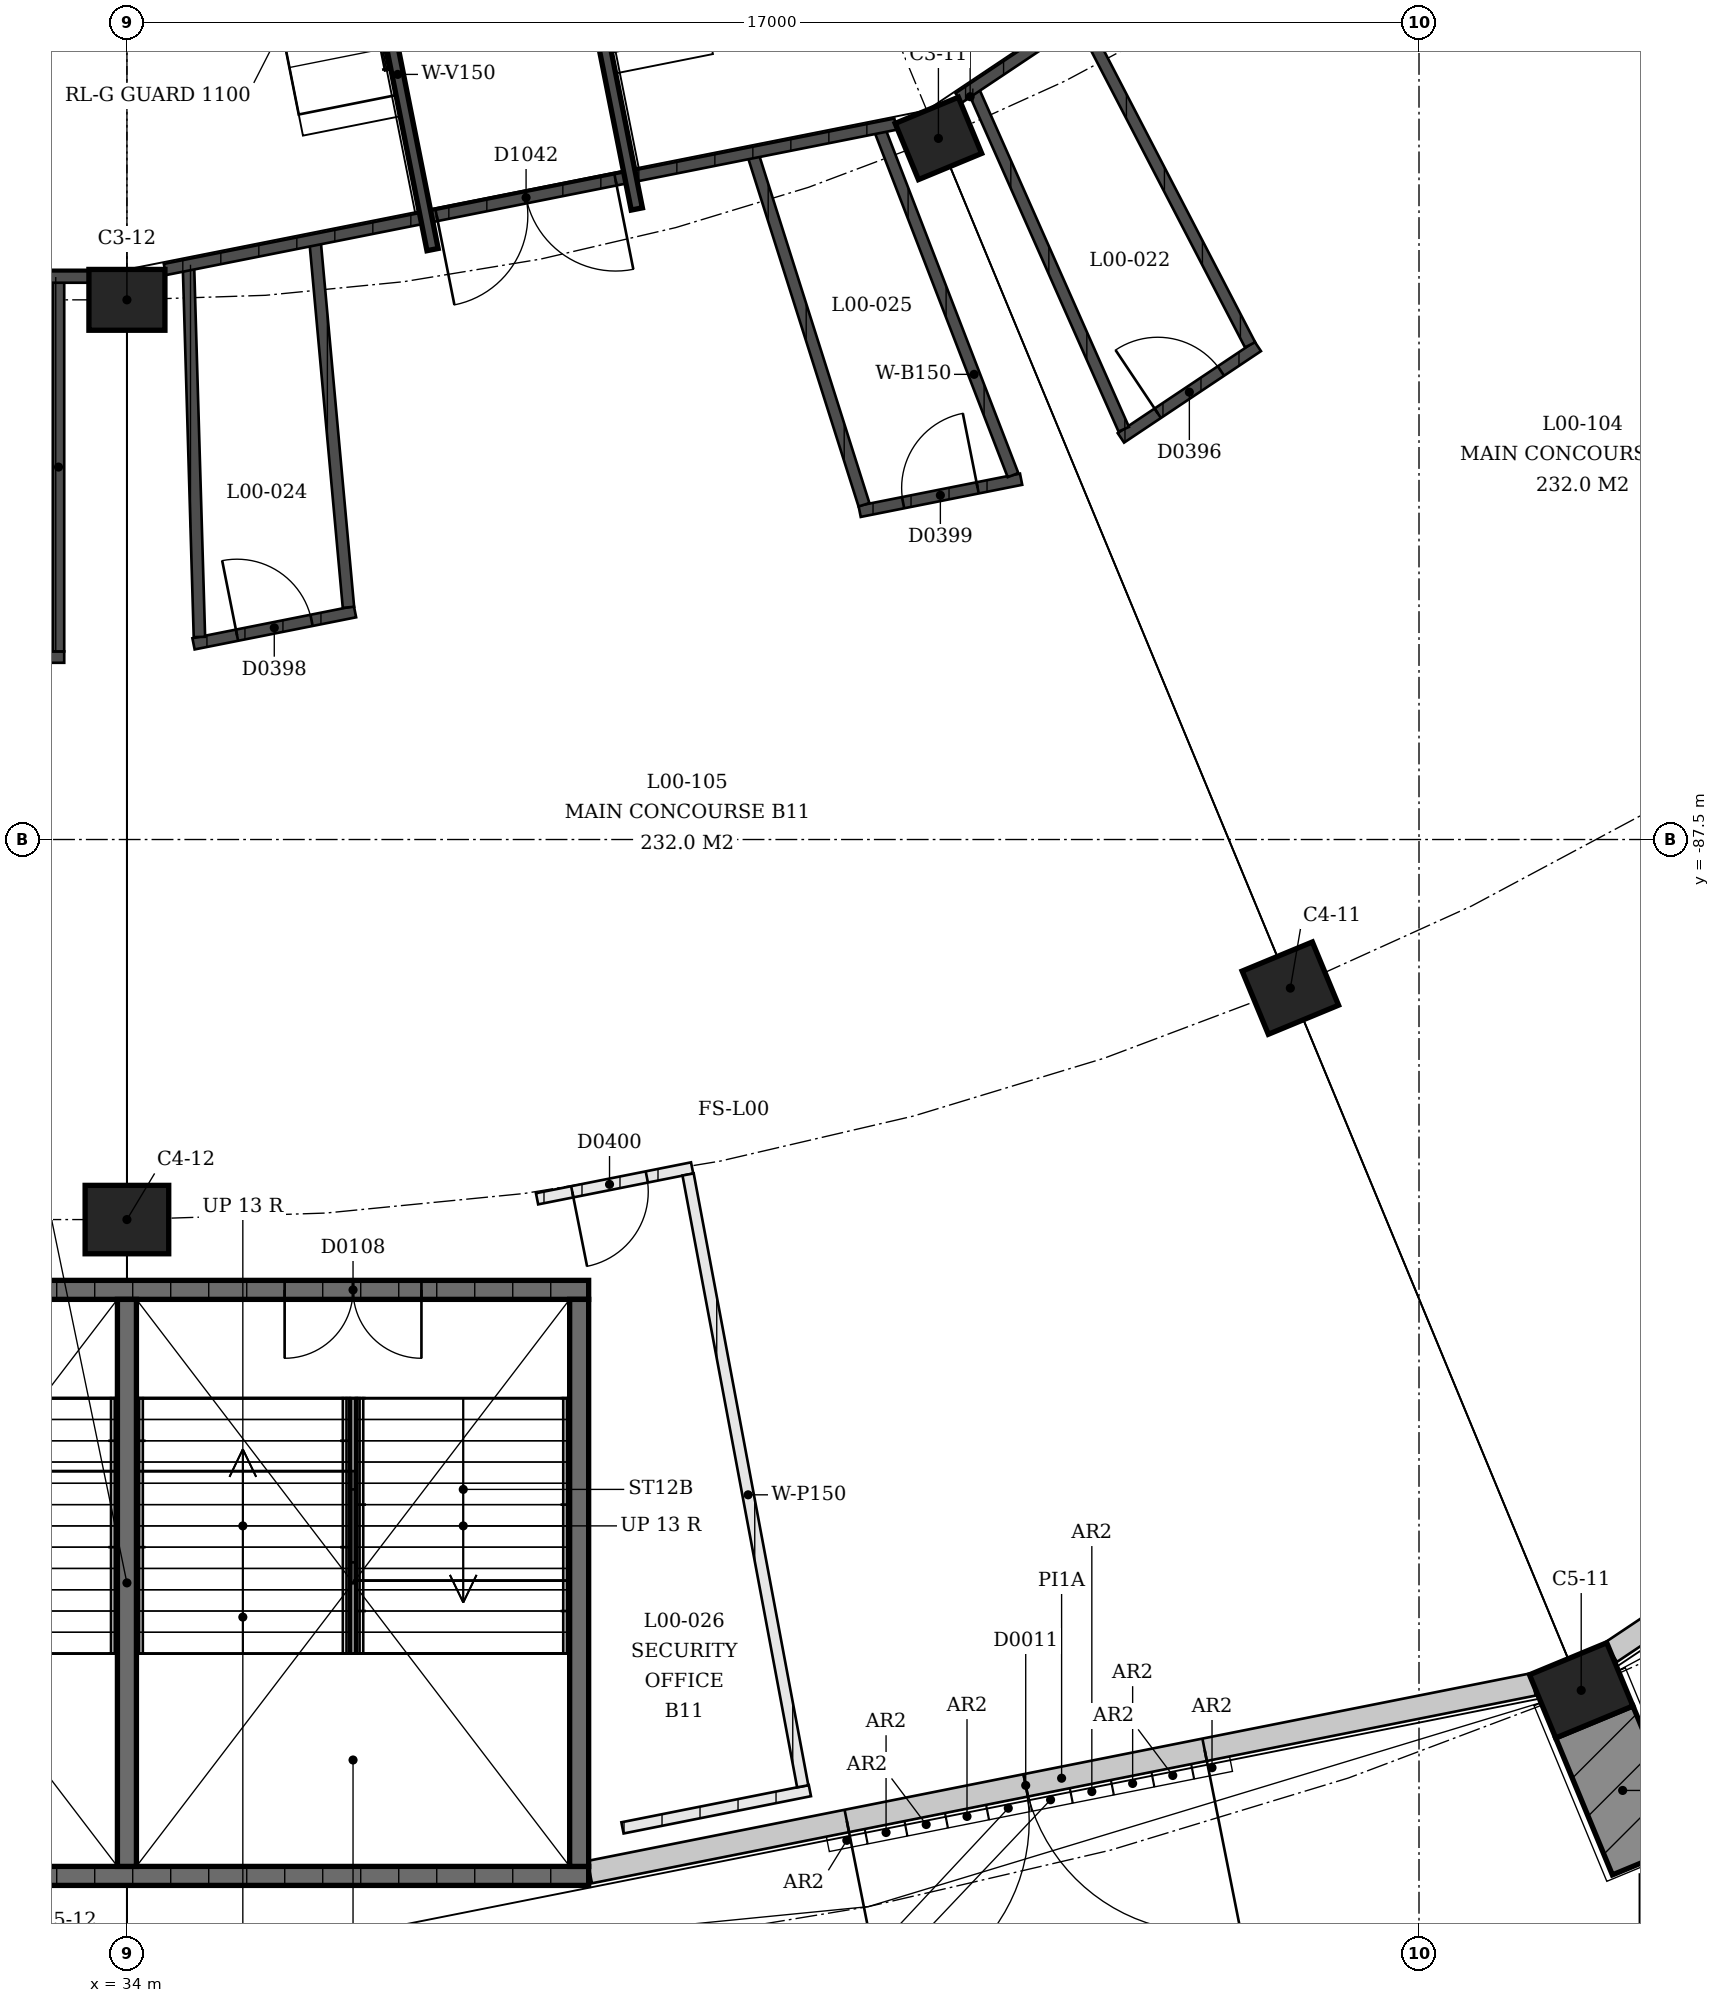
"""IFC4 building model, lengths in metres.
Left out: names, types, materials, properties, quantities, classifications, styles, units other than length and angle.
Written with IfcOpenShell. Run it as: python <this file> out.ifc"""

import sys

from ifc_helpers import new_model, si_unit, direction, frame, frame_2d, origin, origin_2d, place, context, subcontext, project, spatial, rectangle, extrude, element, fill, save


model = new_model("IFC4")
c1 = context("Model", 3, precision=1e-05, world=origin(), true_north=direction((0.0, 1.0)))
c2 = subcontext(c1, "Body", "Model", "MODEL_VIEW")
j1 = project(units=[si_unit("LENGTHUNIT", "METRE"), si_unit("PLANEANGLEUNIT", "RADIAN")], contexts=[c1])
p1 = place(None, origin())
s1 = spatial("IfcSite", under=j1, at=p1, CompositionType="ELEMENT")
p2 = place(p1, origin())
s2 = spatial("IfcBuilding", under=s1, at=p2, CompositionType="ELEMENT")
p3 = place(p2, origin())
s3 = spatial("IfcBuildingStorey", under=s2, at=p3, CompositionType="ELEMENT", Elevation=0.0)
p4 = place(p3, frame((44.677, -78.276, 0.0), z_axis=(0.0, 0.0, 1.0), x_axis=(0.923879532511, 0.382683432365, 0.0)))
e1 = element("IfcColumn", 1, at=p4, inside=s3, PredefinedType="COLUMN", context=c2, shape_type="SweptSolid", body=[
    extrude(rectangle(XDim=0.9, YDim=0.8, at=origin_2d()), origin(), (0.0, 0.0, 1.0), 4.5),
])
p5 = place(p3, frame((49.307, -89.455, 0.0), z_axis=(0.0, 0.0, 1.0), x_axis=(0.923879532511, 0.382683432365, 0.0)))
e2 = element("IfcColumn", 2, at=p5, inside=s3, PredefinedType="COLUMN", context=c2, shape_type="SweptSolid", body=[
    extrude(rectangle(XDim=1.0, YDim=0.9, at=origin_2d()), origin(), (0.0, 0.0, 1.0), 4.5),
])
p6 = place(p3, frame((53.134, -98.694, 0.0), z_axis=(0.0, 0.0, 1.0), x_axis=(0.923879532511, 0.382683432365, 0.0)))
e3 = element("IfcColumn", 3, at=p6, inside=s3, PredefinedType="COLUMN", context=c2, shape_type="SweptSolid", body=[
    extrude(rectangle(XDim=1.1, YDim=0.9, at=origin_2d()), origin(), (0.0, 0.0, 1.0), 4.5),
])
p7 = place(p3, frame((34.0, -80.4, 0.0), z_axis=(0.0, 0.0, 1.0), x_axis=(1.0, 0.0, 0.0)))
e4 = element("IfcColumn", 4, at=p7, inside=s3, PredefinedType="COLUMN", context=c2, shape_type="SweptSolid", body=[
    extrude(rectangle(XDim=1.0, YDim=0.8, at=origin_2d()), origin(), (0.0, 0.0, 1.0), 4.5),
])
p8 = place(p3, frame((34.0, -92.5, 0.0), z_axis=(0.0, 0.0, 1.0), x_axis=(1.0, 0.0, 0.0)))
e5 = element("IfcColumn", 5, at=p8, inside=s3, PredefinedType="COLUMN", context=c2, shape_type="SweptSolid", body=[
    extrude(rectangle(XDim=1.1, YDim=0.9, at=origin_2d()), origin(), (0.0, 0.0, 1.0), 4.5),
])
p9 = place(p3, frame((64.061, -91.152, 0.0), z_axis=(0.0, 0.0, 1.0), x_axis=(-0.831466044974, -0.555575571867, 0.0)))
e6 = element("IfcWall", 6, at=p9, inside=s3, PredefinedType="SOLIDWALL", context=c2, shape_type="SweptSolid", body=[
    extrude(rectangle(XDim=12.675, YDim=0.3, at=frame_2d((6.337, 0.0))), origin(), (0.0, 0.0, 1.0), 2.79),
])
p10 = place(p9, frame((4.363, 0.0, 0.0)))
e7 = element("IfcOpeningElement", 7, at=p10, cuts=e6, PredefinedType="OPENING", context=c2, shape_type="SweptSolid", body=[
    extrude(rectangle(XDim=3.0, YDim=2.4, at=frame_2d((1.5, 1.2))), frame((0.0, 0.16, 0.0), z_axis=(0.0, -1.0, 0.0), x_axis=(1.0, 0.0, 0.0)), (0.0, 0.0, 1.0), 0.32),
])
p11 = place(p3, frame((52.506, -98.615, 0.0), z_axis=(0.0, 0.0, 1.0), x_axis=(-0.980783376708, -0.195099892294, 0.0)))
e8 = element("IfcWall", 8, at=p11, inside=s3, PredefinedType="SOLIDWALL", context=c2, shape_type="SweptSolid", body=[
    extrude(rectangle(XDim=12.66, YDim=0.3, at=frame_2d((6.33, 0.0))), origin(), (0.0, 0.0, 1.0), 2.79),
])
p12 = place(p11, frame((4.412, 0.0, 0.0)))
e9 = element("IfcOpeningElement", 9, at=p12, cuts=e8, PredefinedType="OPENING", context=c2, shape_type="SweptSolid", body=[
    extrude(rectangle(XDim=4.8, YDim=2.4, at=frame_2d((2.4, 1.2))), frame((0.0, 0.16, 0.0), z_axis=(0.0, -1.0, 0.0), x_axis=(1.0, 0.0, 0.0)), (0.0, 0.0, 1.0), 0.32),
])
p13 = place(p3, frame((27.925, -93.425, 0.0), z_axis=(0.0, 0.0, 1.0), x_axis=(1.0, 0.0, 0.0)))
e10 = element("IfcWall", 10, at=p13, inside=s3, PredefinedType="SHEAR", context=c2, shape_type="SweptSolid", body=[
    extrude(rectangle(XDim=12.15, YDim=0.25, at=frame_2d((6.075, 0.0))), origin(), (0.0, 0.0, 1.0), 4.09),
])
p14 = place(p13, frame((2.2, 0.0, 0.0)))
e11 = element("IfcOpeningElement", 11, at=p14, cuts=e10, PredefinedType="OPENING", context=c2, shape_type="SweptSolid", body=[
    extrude(rectangle(XDim=1.8, YDim=2.1, at=frame_2d((0.9, 1.05))), frame((0.0, 0.125, 0.0), z_axis=(0.0, -1.0, 0.0), x_axis=(1.0, 0.0, 0.0)), (0.0, 0.0, 1.0), 0.25),
])
p15 = place(p13, frame((8.15, 0.0, 0.0)))
e12 = element("IfcOpeningElement", 12, at=p15, cuts=e10, PredefinedType="OPENING", context=c2, shape_type="SweptSolid", body=[
    extrude(rectangle(XDim=1.8, YDim=2.1, at=frame_2d((0.9, 1.05))), frame((0.0, 0.125, 0.0), z_axis=(0.0, -1.0, 0.0), x_axis=(1.0, 0.0, 0.0)), (0.0, 0.0, 1.0), 0.25),
])
p16 = place(p3, frame((27.925, -101.135, 0.0), z_axis=(0.0, 0.0, 1.0), x_axis=(1.0, 0.0, 0.0)))
e13 = element("IfcWall", 13, at=p16, inside=s3, PredefinedType="SHEAR", context=c2, shape_type="SweptSolid", body=[
    extrude(rectangle(XDim=12.15, YDim=0.25, at=frame_2d((6.075, 0.0))), origin(), (0.0, 0.0, 1.0), 4.09),
])
for number, where, z_axis, x_axis in (
    (14, (39.95, -93.55, 0.0), (0.0, 0.0, 1.0), (0.0, -1.0, 0.0)),
    (15, (34.0, -93.55, 0.0), (0.0, 0.0, 1.0), (0.0, -1.0, 0.0)),
):
    element("IfcWall", number, at=place(p3, frame(where, z_axis=z_axis, x_axis=x_axis)), inside=s3, PredefinedType="SHEAR", context=c2, shape_type="SweptSolid", body=[
        extrude(rectangle(XDim=7.46, YDim=0.25, at=frame_2d((3.73, 0.0))), origin(), (0.0, 0.0, 1.0), 4.09),
    ])
p17 = place(p3, frame((51.419, -73.417, 0.0), z_axis=(0.0, 0.0, 1.0), x_axis=(0.639917382336, -0.768443715431, 0.0)))
e16 = element("IfcWall", 16, at=p17, inside=s3, PredefinedType="SOLIDWALL", context=c2, shape_type="SweptSolid", body=[
    extrude(rectangle(XDim=4.857, YDim=0.15, at=frame_2d((2.429, 0.0))), origin(), (0.0, 0.0, 1.0), 3.0),
])
p18 = place(p3, frame((48.879, -81.012, 0.0), z_axis=(0.0, 0.0, 1.0), x_axis=(-0.831460345356, -0.555584101735, 0.0)))
e17 = element("IfcWall", 17, at=p18, inside=s3, PredefinedType="SOLIDWALL", context=c2, shape_type="SweptSolid", body=[
    extrude(rectangle(XDim=2.167, YDim=0.15, at=frame_2d((1.083, 0.0))), origin(), (0.0, 0.0, 1.0), 3.0),
])
p19 = place(p18, frame((0.583, 0.0, 0.0)))
e18 = element("IfcOpeningElement", 18, at=p19, cuts=e17, PredefinedType="OPENING", context=c2, shape_type="SweptSolid", body=[
    extrude(rectangle(XDim=1.0, YDim=2.1, at=frame_2d((0.5, 1.05))), frame((0.0, 0.075, 0.0), z_axis=(0.0, -1.0, 0.0), x_axis=(1.0, 0.0, 0.0)), (0.0, 0.0, 1.0), 0.15),
])
p20 = place(p3, frame((46.54, -76.677, 0.0), z_axis=(0.0, 0.0, 1.0), x_axis=(0.460446193467, -0.887687615618, 0.0)))
e19 = element("IfcWall", 19, at=p20, inside=s3, PredefinedType="SOLIDWALL", context=c2, shape_type="SweptSolid", body=[
    extrude(rectangle(XDim=4.86, YDim=0.15, at=frame_2d((2.43, 0.0))), origin(), (0.0, 0.0, 1.0), 3.0),
])
p21 = place(p3, frame((45.129, -77.62, 0.0), z_axis=(0.0, 0.0, 1.0), x_axis=(0.405098626615, -0.914272991352, 0.0)))
e20 = element("IfcWall", 20, at=p21, inside=s3, PredefinedType="SOLIDWALL", context=c2, shape_type="SweptSolid", body=[
    extrude(rectangle(XDim=4.903, YDim=0.15, at=frame_2d((2.451, 0.0))), origin(), (0.0, 0.0, 1.0), 3.0),
])
p22 = place(p3, frame((34.876, -84.926, 0.0), z_axis=(0.0, 0.0, 1.0), x_axis=(0.980766609665, 0.195184162696, 0.0)))
e21 = element("IfcWall", 21, at=p22, inside=s3, PredefinedType="SOLIDWALL", context=c2, shape_type="SweptSolid", body=[
    extrude(rectangle(XDim=2.167, YDim=0.15, at=frame_2d((1.083, 0.0))), origin(), (0.0, 0.0, 1.0), 3.0),
])
p23 = place(p22, frame((0.583, 0.0, 0.0)))
e22 = element("IfcOpeningElement", 22, at=p23, cuts=e21, PredefinedType="OPENING", context=c2, shape_type="SweptSolid", body=[
    extrude(rectangle(XDim=1.0, YDim=2.1, at=frame_2d((0.5, 1.05))), frame((0.0, 0.075, 0.0), z_axis=(0.0, -1.0, 0.0), x_axis=(1.0, 0.0, 0.0)), (0.0, 0.0, 1.0), 0.15),
])
p24 = place(p3, frame((34.809, -79.939, 0.0), z_axis=(0.0, 0.0, 1.0), x_axis=(0.02950597086, -0.999564604057, 0.0)))
e23 = element("IfcWall", 23, at=p24, inside=s3, PredefinedType="SOLIDWALL", context=c2, shape_type="SweptSolid", body=[
    extrude(rectangle(XDim=4.898, YDim=0.15, at=frame_2d((2.449, 0.0))), origin(), (0.0, 0.0, 1.0), 3.0),
])
p25 = place(p3, frame((36.473, -79.608, 0.0), z_axis=(0.0, 0.0, 1.0), x_axis=(0.090871085934, -0.995862664096, 0.0)))
e24 = element("IfcWall", 24, at=p25, inside=s3, PredefinedType="SOLIDWALL", context=c2, shape_type="SweptSolid", body=[
    extrude(rectangle(XDim=4.857, YDim=0.15, at=frame_2d((2.429, 0.0))), origin(), (0.0, 0.0, 1.0), 3.0),
])
p26 = place(p3, frame((43.64, -83.182, 0.0), z_axis=(0.0, 0.0, 1.0), x_axis=(0.980788176969, 0.195075759432, 0.0)))
e25 = element("IfcWall", 25, at=p26, inside=s3, PredefinedType="SOLIDWALL", context=c2, shape_type="SweptSolid", body=[
    extrude(rectangle(XDim=2.166, YDim=0.15, at=frame_2d((1.083, 0.0))), origin(), (0.0, 0.0, 1.0), 3.0),
])
p27 = place(p26, frame((0.583, 0.0, 0.0)))
e26 = element("IfcOpeningElement", 26, at=p27, cuts=e25, PredefinedType="OPENING", context=c2, shape_type="SweptSolid", body=[
    extrude(rectangle(XDim=1.0, YDim=2.1, at=frame_2d((0.5, 1.05))), frame((0.0, 0.075, 0.0), z_axis=(0.0, -1.0, 0.0), x_axis=(1.0, 0.0, 0.0)), (0.0, 0.0, 1.0), 0.15),
])
p28 = place(p3, frame((42.229, -78.463, 0.0), z_axis=(0.0, 0.0, 1.0), x_axis=(0.302162587804, -0.953256403352, 0.0)))
e27 = element("IfcWall", 27, at=p28, inside=s3, PredefinedType="SOLIDWALL", context=c2, shape_type="SweptSolid", body=[
    extrude(rectangle(XDim=4.86, YDim=0.15, at=frame_2d((2.43, 0.0))), origin(), (0.0, 0.0, 1.0), 3.0),
])
p29 = place(p3, frame((43.893, -78.132, 0.0), z_axis=(0.0, 0.0, 1.0), x_axis=(0.360073313022, -0.932924010437, 0.0)))
e28 = element("IfcWall", 28, at=p29, inside=s3, PredefinedType="SOLIDWALL", context=c2, shape_type="SweptSolid", body=[
    extrude(rectangle(XDim=4.903, YDim=0.15, at=frame_2d((2.451, 0.0))), origin(), (0.0, 0.0, 1.0), 3.0),
])
p30 = place(p3, frame((39.396, -92.227, 0.0), z_axis=(0.0, 0.0, 1.0), x_axis=(0.980792255889, 0.195055250603, 0.0)))
e29 = element("IfcWall", 29, at=p30, inside=s3, PredefinedType="PARTITIONING", context=c2, shape_type="SweptSolid", body=[
    extrude(rectangle(XDim=2.08, YDim=0.15, at=frame_2d((1.04, 0.0))), origin(), (0.0, 0.0, 1.0), 3.0),
])
p31 = place(p30, frame((0.472, 0.0, 0.0)))
e30 = element("IfcOpeningElement", 30, at=p31, cuts=e29, PredefinedType="OPENING", context=c2, shape_type="SweptSolid", body=[
    extrude(rectangle(XDim=1.0, YDim=2.1, at=frame_2d((0.5, 1.05))), frame((0.0, 0.075, 0.0), z_axis=(0.0, -1.0, 0.0), x_axis=(1.0, 0.0, 0.0)), (0.0, 0.0, 1.0), 0.15),
])
p32 = place(p3, frame((40.52, -100.503, 0.0), z_axis=(0.0, 0.0, 1.0), x_axis=(0.980796747004, 0.195032666665, 0.0)))
e31 = element("IfcWall", 31, at=p32, inside=s3, PredefinedType="PARTITIONING", context=c2, shape_type="SweptSolid", body=[
    extrude(rectangle(XDim=2.514, YDim=0.15, at=frame_2d((1.257, 0.0))), origin(), (0.0, 0.0, 1.0), 3.0),
])
p33 = place(p3, frame((41.383, -91.906, 0.0), z_axis=(0.0, 0.0, 1.0), x_axis=(0.184160747979, -0.982896138411, 0.0)))
e32 = element("IfcWall", 32, at=p33, inside=s3, PredefinedType="PARTITIONING", context=c2, shape_type="SweptSolid", body=[
    extrude(rectangle(XDim=8.19, YDim=0.15, at=frame_2d((4.095, 0.0))), origin(), (0.0, 0.0, 1.0), 3.0),
])
p34 = place(p3, frame((33.175, -85.1, 0.0), z_axis=(0.0, 0.0, 1.0), x_axis=(-1.0, 0.0, 0.0)))
e33 = element("IfcWall", 33, at=p34, inside=s3, PredefinedType="SOLIDWALL", context=c2, shape_type="SweptSolid", body=[
    extrude(rectangle(XDim=3.65, YDim=0.15, at=frame_2d((1.825, 0.0))), origin(), (0.0, 0.0, 1.0), 3.0),
])
p35 = place(p34, frame((1.325, 0.0, 0.0)))
e34 = element("IfcOpeningElement", 34, at=p35, cuts=e33, PredefinedType="OPENING", context=c2, shape_type="SweptSolid", body=[
    extrude(rectangle(XDim=1.0, YDim=2.1, at=frame_2d((0.5, 1.05))), frame((0.0, 0.075, 0.0), z_axis=(0.0, -1.0, 0.0), x_axis=(1.0, 0.0, 0.0)), (0.0, 0.0, 1.0), 0.15),
])
p36 = place(p3, frame((33.1, -80.1, 0.0), z_axis=(0.0, 0.0, 1.0), x_axis=(0.0, -1.0, 0.0)))
e35 = element("IfcWall", 35, at=p36, inside=s3, PredefinedType="SOLIDWALL", context=c2, shape_type="SweptSolid", body=[
    extrude(rectangle(XDim=4.925, YDim=0.15, at=frame_2d((2.462, 0.0))), origin(), (0.0, 0.0, 1.0), 3.0),
])
p37 = place(p3, frame((53.135, -72.271, 0.0), z_axis=(0.0, 0.0, 1.0), x_axis=(-0.83147031613, -0.555569179667, 0.0)))
e36 = element("IfcWall", 36, at=p37, inside=s3, PredefinedType="SOLIDWALL", context=c2, shape_type="SweptSolid", body=[
    extrude(rectangle(XDim=9.851, YDim=0.15, at=frame_2d((4.926, 0.0))), origin(), (0.0, 0.0, 1.0), 3.0),
])
p38 = place(p3, frame((44.112, -78.089, 0.0), z_axis=(0.0, 0.0, 1.0), x_axis=(-0.980787086023, -0.195081244333, 0.0)))
e37 = element("IfcWall", 37, at=p38, inside=s3, PredefinedType="SOLIDWALL", context=c2, shape_type="SweptSolid", body=[
    extrude(rectangle(XDim=9.8, YDim=0.15, at=frame_2d((4.9, 0.0))), origin(), (0.0, 0.0, 1.0), 3.0),
])
p39 = place(p38, frame((3.756, 0.0, 0.0)))
e38 = element("IfcOpeningElement", 38, at=p39, cuts=e37, PredefinedType="OPENING", context=c2, shape_type="SweptSolid", body=[
    extrude(rectangle(XDim=2.4, YDim=2.4, at=frame_2d((1.2, 1.2))), frame((0.0, 0.075, 0.0), z_axis=(0.0, -1.0, 0.0), x_axis=(1.0, 0.0, 0.0)), (0.0, 0.0, 1.0), 0.15),
])
p40 = place(p3, frame((33.5, -80.1, 0.0), z_axis=(0.0, 0.0, 1.0), x_axis=(-1.0, 0.0, 0.0)))
e39 = element("IfcWall", 39, at=p40, inside=s3, PredefinedType="SOLIDWALL", context=c2, shape_type="SweptSolid", body=[
    extrude(rectangle(XDim=12.7, YDim=0.15, at=frame_2d((6.35, 0.0))), origin(), (0.0, 0.0, 1.0), 3.0),
])
for number, where, z_axis, x_axis in (
    (40, (37.104, -75.129, 0.0), (0.0, 0.0, 1.0), (0.195, -0.981, 0.0)),
    (41, (39.792, -74.595, 0.0), (0.0, 0.0, 1.0), (0.195, -0.981, 0.0)),
):
    element("IfcWall", number, at=place(p3, frame(where, z_axis=z_axis, x_axis=x_axis)), inside=s3, PredefinedType="SOLIDWALL", context=c2, shape_type="SweptSolid", body=[
        extrude(rectangle(XDim=4.7, YDim=0.15, at=frame_2d((2.35, 0.0))), origin(), (0.0, 0.0, 1.0), 2.75),
    ])
p41 = place(p12, origin())
e42 = element("IfcDoor", 42, at=p41, inside=s3, OperationType="DOUBLE_DOOR_SINGLE_SWING", PredefinedType="DOOR", context=c2, shape_type="SweptSolid", body=[
    extrude(rectangle(XDim=4.8, YDim=2.4, at=frame_2d((2.4, 1.2))), frame((0.0, 0.025, 0.0), z_axis=(0.0, -1.0, 0.0), x_axis=(1.0, 0.0, 0.0)), (0.0, 0.0, 1.0), 0.05),
])
fill(e9, e42)
p42 = place(p15, origin())
e43 = element("IfcDoor", 43, at=p42, inside=s3, OperationType="DOUBLE_DOOR_SINGLE_SWING", PredefinedType="DOOR", context=c2, shape_type="SweptSolid", body=[
    extrude(rectangle(XDim=1.8, YDim=2.1, at=frame_2d((0.9, 1.05))), frame((0.0, 0.025, 0.0), z_axis=(0.0, -1.0, 0.0), x_axis=(1.0, 0.0, 0.0)), (0.0, 0.0, 1.0), 0.05),
])
fill(e12, e43)
p43 = place(p19, origin())
e44 = element("IfcDoor", 44, at=p43, inside=s3, OperationType="SINGLE_SWING_RIGHT", PredefinedType="DOOR", context=c2, shape_type="SweptSolid", body=[
    extrude(rectangle(XDim=1.0, YDim=2.1, at=frame_2d((0.5, 1.05))), frame((0.0, 0.025, 0.0), z_axis=(0.0, -1.0, 0.0), x_axis=(1.0, 0.0, 0.0)), (0.0, 0.0, 1.0), 0.05),
])
fill(e18, e44)
p44 = place(p23, origin())
e45 = element("IfcDoor", 45, at=p44, inside=s3, OperationType="SINGLE_SWING_RIGHT", PredefinedType="DOOR", context=c2, shape_type="SweptSolid", body=[
    extrude(rectangle(XDim=1.0, YDim=2.1, at=frame_2d((0.5, 1.05))), frame((0.0, 0.025, 0.0), z_axis=(0.0, -1.0, 0.0), x_axis=(1.0, 0.0, 0.0)), (0.0, 0.0, 1.0), 0.05),
])
fill(e22, e45)
p45 = place(p27, origin())
e46 = element("IfcDoor", 46, at=p45, inside=s3, OperationType="SINGLE_SWING_LEFT", PredefinedType="DOOR", context=c2, shape_type="SweptSolid", body=[
    extrude(rectangle(XDim=1.0, YDim=2.1, at=frame_2d((0.5, 1.05))), frame((0.0, 0.025, 0.0), z_axis=(0.0, -1.0, 0.0), x_axis=(1.0, 0.0, 0.0)), (0.0, 0.0, 1.0), 0.05),
])
fill(e26, e46)
p46 = place(p31, origin())
e47 = element("IfcDoor", 47, at=p46, inside=s3, OperationType="SINGLE_SWING_LEFT", PredefinedType="DOOR", context=c2, shape_type="SweptSolid", body=[
    extrude(rectangle(XDim=1.0, YDim=2.1, at=frame_2d((0.5, 1.05))), frame((0.0, 0.025, 0.0), z_axis=(0.0, -1.0, 0.0), x_axis=(1.0, 0.0, 0.0)), (0.0, 0.0, 1.0), 0.05),
])
fill(e30, e47)
p47 = place(p39, origin())
e48 = element("IfcDoor", 48, at=p47, inside=s3, OperationType="DOUBLE_DOOR_SINGLE_SWING", PredefinedType="DOOR", context=c2, shape_type="SweptSolid", body=[
    extrude(rectangle(XDim=2.4, YDim=2.4, at=frame_2d((1.2, 1.2))), frame((0.0, 0.025, 0.0), z_axis=(0.0, -1.0, 0.0), x_axis=(1.0, 0.0, 0.0)), (0.0, 0.0, 1.0), 0.05),
])
fill(e38, e48)
save(model, sys.argv[1])
